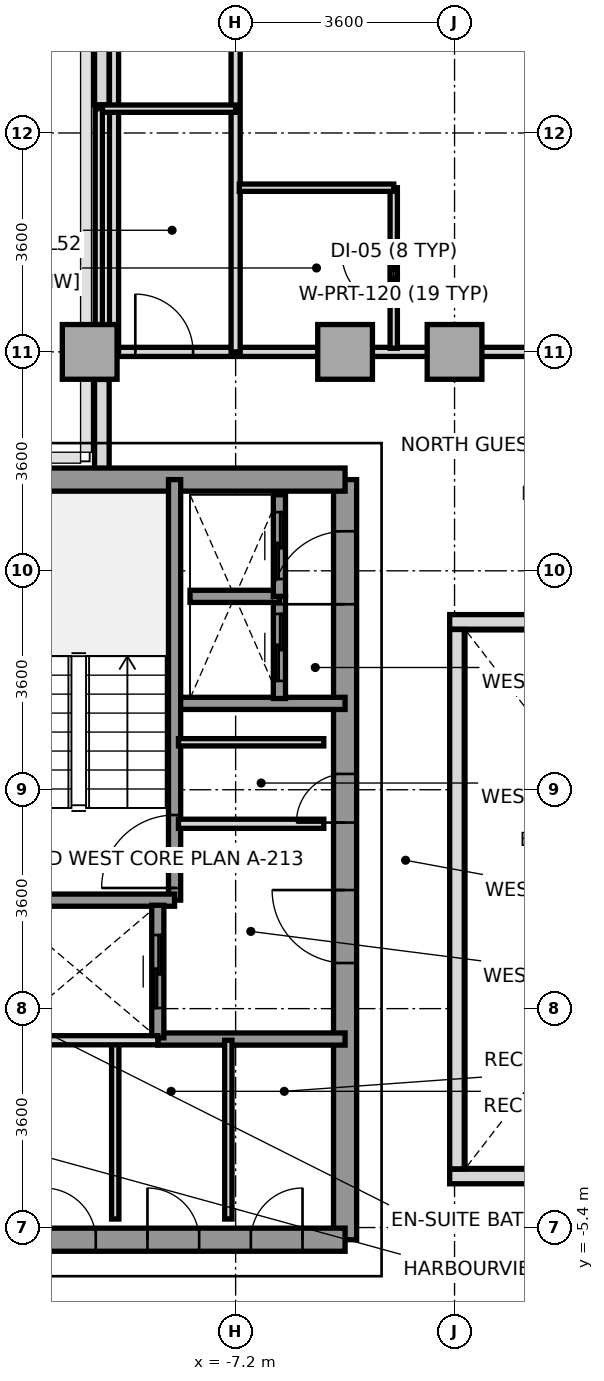
"""IFC4 building model, lengths in metres.
Left out: names, types, materials, properties, quantities, classifications, styles, units other than length and angle.
Written with IfcOpenShell. Run it as: python <this file> out.ifc"""

import sys

from ifc_helpers import new_model, si_unit, direction, frame, frame_2d, origin, origin_2d, place, context, subcontext, project, spatial, rectangle, extrude, source, transform, mapped, element, fill, save


model = new_model("IFC4")
c1 = context("Model", 3, precision=1e-05, world=origin(), true_north=direction((0.0, 1.0)))
c2 = subcontext(c1, "Body", "Model", "MODEL_VIEW")
j1 = project(units=[si_unit("LENGTHUNIT", "METRE"), si_unit("PLANEANGLEUNIT", "RADIAN")], contexts=[c1])
p1 = place(None, origin())
s1 = spatial("IfcSite", under=j1, at=p1, CompositionType="ELEMENT")
p2 = place(p1, origin())
s2 = spatial("IfcBuilding", under=s1, at=p2, CompositionType="ELEMENT")
p3 = place(p2, frame((0.0, 0.0, 191.0)))
s3 = spatial("IfcBuildingStorey", under=s2, at=p3, CompositionType="ELEMENT", Elevation=191.0)
m1 = source(origin(), c2, "Body", "SweptSolid", [
    extrude(rectangle(XDim=0.9, YDim=0.9, at=origin_2d()), origin(), (0.0, 0.0, 1.0), 3.2),
])
for number, where, z_axis, x_axis in (
    (1, (-9.6, 9.0, 0.0), (0.0, 0.0, 1.0), (1.0, 0.0, 0.0)),
    (2, (-5.4, 9.0, 0.0), (0.0, 0.0, 1.0), (1.0, 0.0, 0.0)),
    (3, (-3.6, 9.0, 0.0), (0.0, 0.0, 1.0), (1.0, 0.0, 0.0)),
):
    element("IfcColumn", number, at=place(p3, frame(where, z_axis=z_axis, x_axis=x_axis)), inside=s3, PredefinedType="COLUMN", context=c2, shape_type="MappedRepresentation", body=[
        mapped(m1, transform((0.0, 0.0, 0.0), x_axis=(1.0, 0.0, 0.0), y_axis=(0.0, 1.0, 0.0), z_axis=(0.0, 0.0, 1.0), scale=1.0)),
    ])
p4 = place(p3, frame((-9.4, 6.953, 0.0), z_axis=(0.0, 0.0, 1.0), x_axis=(0.0, 1.0, 0.0)))
e4 = element("IfcWall", 4, at=p4, inside=s3, PredefinedType="PARAPET", context=c2, shape_type="SweptSolid", body=[
    extrude(rectangle(XDim=1.594, YDim=0.24, at=frame_2d((0.797, 0.0))), origin(), (0.0, 0.0, 1.0), 1.15),
])
p5 = place(p3, frame((-9.4, 13.063, 0.0), z_axis=(0.0, 0.0, 1.0), x_axis=(0.0, 1.0, 0.0)))
e5 = element("IfcWall", 5, at=p5, inside=s3, PredefinedType="PARAPET", context=c2, shape_type="SweptSolid", body=[
    extrude(rectangle(XDim=2.54, YDim=0.24, at=frame_2d((1.27, 0.0))), origin(), (0.0, 0.0, 1.0), 1.15),
])
p6 = place(p3, frame((-5.4, -5.6, 0.0), z_axis=(0.0, 0.0, 1.0), x_axis=(0.0, 1.0, 0.0)))
e6 = element("IfcWall", 6, at=p6, inside=s3, PredefinedType="SHEAR", context=c2, shape_type="SweptSolid", body=[
    extrude(rectangle(XDim=12.5, YDim=0.38, at=frame_2d((6.25, 0.0))), origin(), (0.0, 0.0, 1.0), 3.2),
])
p7 = place(p6, frame((4.55, 0.0, 0.0)))
e7 = element("IfcOpeningElement", 7, at=p7, cuts=e6, PredefinedType="OPENING", context=c2, shape_type="SweptSolid", body=[
    extrude(rectangle(XDim=1.2, YDim=2.2, at=frame_2d((0.6, 1.1))), frame((0.0, 0.2, 0.0), z_axis=(0.0, -1.0, 0.0), x_axis=(1.0, 0.0, 0.0)), (0.0, 0.0, 1.0), 0.4),
])
p8 = place(p6, frame((10.45, 0.0, 0.0)))
e8 = element("IfcOpeningElement", 8, at=p8, cuts=e6, PredefinedType="OPENING", context=c2, shape_type="SweptSolid", body=[
    extrude(rectangle(XDim=1.2, YDim=2.2, at=frame_2d((0.6, 1.1))), frame((0.0, 0.2, 0.0), z_axis=(0.0, -1.0, 0.0), x_axis=(1.0, 0.0, 0.0)), (0.0, 0.0, 1.0), 0.4),
])
p9 = place(p6, frame((6.86, 0.0, 0.0)))
e9 = element("IfcOpeningElement", 9, at=p9, cuts=e6, PredefinedType="OPENING", context=c2, shape_type="SweptSolid", body=[
    extrude(rectangle(XDim=0.8, YDim=2.1, at=frame_2d((0.4, 1.05))), frame((0.0, 0.2, 0.0), z_axis=(0.0, -1.0, 0.0), x_axis=(1.0, 0.0, 0.0)), (0.0, 0.0, 1.0), 0.4),
])
p10 = place(p3, frame((-11.356, 6.9, 0.0), z_axis=(0.0, 0.0, 1.0), x_axis=(1.0, 0.0, 0.0)))
e10 = element("IfcWall", 10, at=p10, inside=s3, PredefinedType="SHEAR", context=c2, shape_type="SweptSolid", body=[
    extrude(rectangle(XDim=5.956, YDim=0.38, at=frame_2d((2.978, 0.0))), origin(), (0.0, 0.0, 1.0), 3.2),
])
p11 = place(p3, frame((-13.2, -5.6, 0.0), z_axis=(0.0, 0.0, 1.0), x_axis=(1.0, 0.0, 0.0)))
e11 = element("IfcWall", 11, at=p11, inside=s3, PredefinedType="SHEAR", context=c2, shape_type="SweptSolid", body=[
    extrude(rectangle(XDim=7.8, YDim=0.38, at=frame_2d((3.9, 0.0))), origin(), (0.0, 0.0, 1.0), 3.2),
])
p12 = place(p11, frame((0.28, 0.0, 0.0)))
e12 = element("IfcOpeningElement", 12, at=p12, cuts=e11, PredefinedType="OPENING", context=c2, shape_type="SweptSolid", body=[
    extrude(rectangle(XDim=0.85, YDim=2.1, at=frame_2d((0.425, 1.05))), frame((0.0, 0.2, 0.0), z_axis=(0.0, -1.0, 0.0), x_axis=(1.0, 0.0, 0.0)), (0.0, 0.0, 1.0), 0.4),
])
p13 = place(p11, frame((1.36, 0.0, 0.0)))
e13 = element("IfcOpeningElement", 13, at=p13, cuts=e11, PredefinedType="OPENING", context=c2, shape_type="SweptSolid", body=[
    extrude(rectangle(XDim=0.85, YDim=2.1, at=frame_2d((0.425, 1.05))), frame((0.0, 0.2, 0.0), z_axis=(0.0, -1.0, 0.0), x_axis=(1.0, 0.0, 0.0)), (0.0, 0.0, 1.0), 0.4),
])
p14 = place(p11, frame((2.85, 0.0, 0.0)))
e14 = element("IfcOpeningElement", 14, at=p14, cuts=e11, PredefinedType="OPENING", context=c2, shape_type="SweptSolid", body=[
    extrude(rectangle(XDim=0.85, YDim=2.1, at=frame_2d((0.425, 1.05))), frame((0.0, 0.2, 0.0), z_axis=(0.0, -1.0, 0.0), x_axis=(1.0, 0.0, 0.0)), (0.0, 0.0, 1.0), 0.4),
])
p15 = place(p11, frame((4.55, 0.0, 0.0)))
e15 = element("IfcOpeningElement", 15, at=p15, cuts=e11, PredefinedType="OPENING", context=c2, shape_type="SweptSolid", body=[
    extrude(rectangle(XDim=0.85, YDim=2.1, at=frame_2d((0.425, 1.05))), frame((0.0, 0.2, 0.0), z_axis=(0.0, -1.0, 0.0), x_axis=(1.0, 0.0, 0.0)), (0.0, 0.0, 1.0), 0.4),
])
p16 = place(p11, frame((6.25, 0.0, 0.0)))
e16 = element("IfcOpeningElement", 16, at=p16, cuts=e11, PredefinedType="OPENING", context=c2, shape_type="SweptSolid", body=[
    extrude(rectangle(XDim=0.85, YDim=2.1, at=frame_2d((0.425, 1.05))), frame((0.0, 0.2, 0.0), z_axis=(0.0, -1.0, 0.0), x_axis=(1.0, 0.0, 0.0)), (0.0, 0.0, 1.0), 0.4),
])
p17 = place(p3, frame((-8.18, 3.22, 0.0), z_axis=(0.0, 0.0, 1.0), x_axis=(1.0, 0.0, 0.0)))
e17 = element("IfcWall", 17, at=p17, inside=s3, PredefinedType="SOLIDWALL", context=c2, shape_type="SweptSolid", body=[
    extrude(rectangle(XDim=2.78, YDim=0.2, at=frame_2d((1.39, 0.0))), origin(), (0.0, 0.0, 1.0), 3.2),
])
p18 = place(p3, frame((-8.48, -2.3, 0.0), z_axis=(0.0, 0.0, 1.0), x_axis=(1.0, 0.0, 0.0)))
e18 = element("IfcWall", 18, at=p18, inside=s3, PredefinedType="SOLIDWALL", context=c2, shape_type="SweptSolid", body=[
    extrude(rectangle(XDim=3.08, YDim=0.2, at=frame_2d((1.54, 0.0))), origin(), (0.0, 0.0, 1.0), 3.2),
])
p19 = place(p3, frame((-8.204, -0.016, 0.0), z_axis=(0.0, 0.0, 1.0), x_axis=(0.0, 1.0, 0.0)))
e19 = element("IfcWall", 19, at=p19, inside=s3, PredefinedType="SOLIDWALL", context=c2, shape_type="SweptSolid", body=[
    extrude(rectangle(XDim=6.916, YDim=0.2, at=frame_2d((3.458, 0.0))), origin(), (0.0, 0.0, 1.0), 3.2),
])
p20 = place(p19, frame((0.2, 0.0, 0.0)))
e20 = element("IfcOpeningElement", 20, at=p20, cuts=e19, PredefinedType="OPENING", context=c2, shape_type="SweptSolid", body=[
    extrude(rectangle(XDim=1.2, YDim=2.2, at=frame_2d((0.6, 1.1))), frame((0.0, 0.11, 0.0), z_axis=(0.0, -1.0, 0.0), x_axis=(1.0, 0.0, 0.0)), (0.0, 0.0, 1.0), 0.22),
])
p21 = place(p3, frame((-11.356, -0.016, 0.0), z_axis=(0.0, 0.0, 1.0), x_axis=(1.0, 0.0, 0.0)))
e21 = element("IfcWall", 21, at=p21, inside=s3, PredefinedType="SOLIDWALL", context=c2, shape_type="SweptSolid", body=[
    extrude(rectangle(XDim=3.152, YDim=0.2, at=frame_2d((1.576, 0.0))), origin(), (0.0, 0.0, 1.0), 3.2),
])
p22 = place(p3, frame((-8.48, -2.28, 0.0), z_axis=(0.0, 0.0, 1.0), x_axis=(0.0, 1.0, 0.0)))
e22 = element("IfcWall", 22, at=p22, inside=s3, PredefinedType="SOLIDWALL", context=c2, shape_type="SweptSolid", body=[
    extrude(rectangle(XDim=2.18, YDim=0.2, at=frame_2d((1.09, 0.0))), origin(), (0.0, 0.0, 1.0), 3.2),
])
p23 = place(p22, frame((0.49, 0.0, 0.0)))
e23 = element("IfcOpeningElement", 23, at=p23, cuts=e22, PredefinedType="OPENING", context=c2, shape_type="SweptSolid", body=[
    extrude(rectangle(XDim=1.2, YDim=2.2, at=frame_2d((0.6, 1.1))), frame((0.0, 0.11, 0.0), z_axis=(0.0, -1.0, 0.0), x_axis=(1.0, 0.0, 0.0)), (0.0, 0.0, 1.0), 0.22),
])
p24 = place(p3, frame((-6.48, 3.3, 0.0), z_axis=(0.0, 0.0, 1.0), x_axis=(0.0, 1.0, 0.0)))
e24 = element("IfcWall", 24, at=p24, inside=s3, PredefinedType="SOLIDWALL", context=c2, shape_type="SweptSolid", body=[
    extrude(rectangle(XDim=1.68, YDim=0.2, at=frame_2d((0.84, 0.0))), origin(), (0.0, 0.0, 1.0), 3.2),
])
p25 = place(p24, frame((0.29, 0.0, 0.0)))
e25 = element("IfcOpeningElement", 25, at=p25, cuts=e24, PredefinedType="OPENING", context=c2, shape_type="SweptSolid", body=[
    extrude(rectangle(XDim=1.1, YDim=2.2, at=frame_2d((0.55, 1.1))), frame((0.0, 0.11, 0.0), z_axis=(0.0, -1.0, 0.0), x_axis=(1.0, 0.0, 0.0)), (0.0, 0.0, 1.0), 0.22),
])
p26 = place(p3, frame((-7.95, 4.98, 0.0), z_axis=(0.0, 0.0, 1.0), x_axis=(1.0, 0.0, 0.0)))
e26 = element("IfcWall", 26, at=p26, inside=s3, PredefinedType="SOLIDWALL", context=c2, shape_type="SweptSolid", body=[
    extrude(rectangle(XDim=1.47, YDim=0.2, at=frame_2d((0.735, 0.0))), origin(), (0.0, 0.0, 1.0), 3.2),
])
p27 = place(p3, frame((-6.48, 4.98, 0.0), z_axis=(0.0, 0.0, 1.0), x_axis=(0.0, 1.0, 0.0)))
e27 = element("IfcWall", 27, at=p27, inside=s3, PredefinedType="SOLIDWALL", context=c2, shape_type="SweptSolid", body=[
    extrude(rectangle(XDim=1.67, YDim=0.2, at=frame_2d((0.835, 0.0))), origin(), (0.0, 0.0, 1.0), 3.2),
])
p28 = place(p27, frame((0.285, 0.0, 0.0)))
e28 = element("IfcOpeningElement", 28, at=p28, cuts=e27, PredefinedType="OPENING", context=c2, shape_type="SweptSolid", body=[
    extrude(rectangle(XDim=1.1, YDim=2.2, at=frame_2d((0.55, 1.1))), frame((0.0, 0.11, 0.0), z_axis=(0.0, -1.0, 0.0), x_axis=(1.0, 0.0, 0.0)), (0.0, 0.0, 1.0), 0.22),
])
p29 = place(p3, frame((-8.14, 1.24, 0.0), z_axis=(0.0, 0.0, 1.0), x_axis=(1.0, 0.0, 0.0)))
e29 = element("IfcWall", 29, at=p29, inside=s3, PredefinedType="PARTITIONING", context=c2, shape_type="SweptSolid", body=[
    extrude(rectangle(XDim=2.39, YDim=0.15, at=frame_2d((1.195, 0.0))), origin(), (0.0, 0.0, 1.0), 2.3),
])
p30 = place(p3, frame((-8.14, 2.58, 0.0), z_axis=(0.0, 0.0, 1.0), x_axis=(1.0, 0.0, 0.0)))
e30 = element("IfcWall", 30, at=p30, inside=s3, PredefinedType="PARTITIONING", context=c2, shape_type="SweptSolid", body=[
    extrude(rectangle(XDim=2.39, YDim=0.12, at=frame_2d((1.195, 0.0))), origin(), (0.0, 0.0, 1.0), 2.3),
])
for number, where, z_axis, x_axis in (
    (31, (-9.18, -5.26, 0.0), (0.0, 0.0, 1.0), (0.0, 1.0, 0.0)),
    (32, (-7.32, -5.26, 0.0), (0.0, 0.0, 1.0), (0.0, 1.0, 0.0)),
):
    element("IfcWall", number, at=place(p3, frame(where, z_axis=z_axis, x_axis=x_axis)), inside=s3, PredefinedType="PARTITIONING", context=c2, shape_type="SweptSolid", body=[
        extrude(rectangle(XDim=2.94, YDim=0.12, at=frame_2d((1.47, 0.0))), origin(), (0.0, 0.0, 1.0), 3.2),
    ])
p31 = place(p3, frame((-11.04, -2.32, 0.0), z_axis=(0.0, 0.0, 1.0), x_axis=(1.0, 0.0, 0.0)))
e33 = element("IfcWall", 33, at=p31, inside=s3, PredefinedType="PARTITIONING", context=c2, shape_type="SweptSolid", body=[
    extrude(rectangle(XDim=2.56, YDim=0.15, at=frame_2d((1.28, 0.0))), origin(), (0.0, 0.0, 1.0), 3.2),
])
p32 = place(p3, frame((-9.55, 9.0, 0.0), z_axis=(0.0, 0.0, 1.0), x_axis=(1.0, 0.0, 0.0)))
e34 = element("IfcWall", 34, at=p32, inside=s3, PredefinedType="PARTITIONING", context=c2, shape_type="SweptSolid", body=[
    extrude(rectangle(XDim=19.1, YDim=0.15, at=frame_2d((9.55, 0.0))), origin(), (0.0, 0.0, 1.0), 2.75),
])
p33 = place(p32, frame((0.7, 0.0, 0.0)))
e35 = element("IfcOpeningElement", 35, at=p33, cuts=e34, PredefinedType="OPENING", context=c2, shape_type="SweptSolid", body=[
    extrude(rectangle(XDim=0.95, YDim=2.15, at=frame_2d((0.475, 1.075))), frame((0.0, 0.085, 0.0), z_axis=(0.0, -1.0, 0.0), x_axis=(1.0, 0.0, 0.0)), (0.0, 0.0, 1.0), 0.17),
])
p34 = place(p32, frame((7.15, 0.0, 0.0)))
e36 = element("IfcOpeningElement", 36, at=p34, cuts=e34, PredefinedType="OPENING", context=c2, shape_type="SweptSolid", body=[
    extrude(rectangle(XDim=0.95, YDim=2.15, at=frame_2d((0.475, 1.075))), frame((0.0, 0.085, 0.0), z_axis=(0.0, -1.0, 0.0), x_axis=(1.0, 0.0, 0.0)), (0.0, 0.0, 1.0), 0.17),
])
p35 = place(p32, frame((11.55, 0.0, 0.0)))
e37 = element("IfcOpeningElement", 37, at=p35, cuts=e34, PredefinedType="OPENING", context=c2, shape_type="SweptSolid", body=[
    extrude(rectangle(XDim=0.95, YDim=2.15, at=frame_2d((0.475, 1.075))), frame((0.0, 0.085, 0.0), z_axis=(0.0, -1.0, 0.0), x_axis=(1.0, 0.0, 0.0)), (0.0, 0.0, 1.0), 0.17),
])
p36 = place(p3, frame((-9.2, 9.0, 0.0), z_axis=(0.0, 0.0, 1.0), x_axis=(0.0, 1.0, 0.0)))
e38 = element("IfcWall", 38, at=p36, inside=s3, PredefinedType="PARTITIONING", context=c2, shape_type="SweptSolid", body=[
    extrude(rectangle(XDim=6.68, YDim=0.15, at=frame_2d((3.34, 0.0))), origin(), (0.0, 0.0, 1.0), 2.75),
])
p37 = place(p3, frame((-7.2, 9.0, 0.0), z_axis=(0.0, 0.0, 1.0), x_axis=(0.0, 1.0, 0.0)))
e39 = element("IfcWall", 39, at=p37, inside=s3, PredefinedType="PARTITIONING", context=c2, shape_type="SweptSolid", body=[
    extrude(rectangle(XDim=14.4, YDim=0.15, at=frame_2d((7.2, 0.0))), origin(), (0.0, 0.0, 1.0), 2.75),
])
p38 = place(p3, frame((-9.45, 13.0, 0.0), z_axis=(0.0, 0.0, 1.0), x_axis=(1.0, 0.0, 0.0)))
e40 = element("IfcWall", 40, at=p38, inside=s3, PredefinedType="PARTITIONING", context=c2, shape_type="SweptSolid", body=[
    extrude(rectangle(XDim=2.25, YDim=0.12, at=frame_2d((1.125, 0.0))), origin(), (0.0, 0.0, 1.0), 3.2),
])
p39 = place(p3, frame((-9.45, 9.0, 0.0), z_axis=(0.0, 0.0, 1.0), x_axis=(0.0, 1.0, 0.0)))
e41 = element("IfcWall", 41, at=p39, inside=s3, PredefinedType="PARTITIONING", context=c2, shape_type="SweptSolid", body=[
    extrude(rectangle(XDim=4.0, YDim=0.12, at=frame_2d((2.0, 0.0))), origin(), (0.0, 0.0, 1.0), 3.2),
])
p40 = place(p3, frame((-4.6, 9.06, 0.0), z_axis=(0.0, 0.0, 1.0), x_axis=(0.0, 1.0, 0.0)))
e42 = element("IfcWall", 42, at=p40, inside=s3, PredefinedType="PARTITIONING", context=c2, shape_type="SweptSolid", body=[
    extrude(rectangle(XDim=2.64, YDim=0.12, at=frame_2d((1.32, 0.0))), origin(), (0.0, 0.0, 1.0), 3.2),
])
p41 = place(p40, frame((0.7, 0.0, 0.0)))
e43 = element("IfcOpeningElement", 43, at=p41, cuts=e42, PredefinedType="OPENING", context=c2, shape_type="SweptSolid", body=[
    extrude(rectangle(XDim=0.85, YDim=2.1, at=frame_2d((0.425, 1.05))), frame((0.0, 0.07, 0.0), z_axis=(0.0, -1.0, 0.0), x_axis=(1.0, 0.0, 0.0)), (0.0, 0.0, 1.0), 0.14),
])
p42 = place(p3, frame((-7.14, 11.7, 0.0), z_axis=(0.0, 0.0, 1.0), x_axis=(1.0, 0.0, 0.0)))
e44 = element("IfcWall", 44, at=p42, inside=s3, PredefinedType="PARTITIONING", context=c2, shape_type="SweptSolid", body=[
    extrude(rectangle(XDim=2.54, YDim=0.12, at=frame_2d((1.27, 0.0))), origin(), (0.0, 0.0, 1.0), 3.2),
])
for number, where, z_axis, x_axis in (
    (45, (-3.68, -4.56, 0.0), (0.0, 0.0, 1.0), (1.0, 0.0, 0.0)),
    (46, (-3.68, 4.56, 0.0), (0.0, 0.0, 1.0), (1.0, 0.0, 0.0)),
):
    element("IfcWall", number, at=place(p3, frame(where, z_axis=z_axis, x_axis=x_axis)), inside=s3, PredefinedType="PARAPET", context=c2, shape_type="SweptSolid", body=[
        extrude(rectangle(XDim=7.36, YDim=0.24, at=frame_2d((3.68, 0.0))), origin(), (0.0, 0.0, 1.0), 1.15),
    ])
p43 = place(p3, frame((-3.56, -4.435, 0.0), z_axis=(0.0, 0.0, 1.0), x_axis=(0.0, 1.0, 0.0)))
e47 = element("IfcWall", 47, at=p43, inside=s3, PredefinedType="PARAPET", context=c2, shape_type="SweptSolid", body=[
    extrude(rectangle(XDim=8.87, YDim=0.24, at=frame_2d((4.435, 0.0))), origin(), (0.0, 0.0, 1.0), 1.15),
])
m2 = source(origin(), c2, "Body", "SweptSolid", [
    extrude(rectangle(XDim=1.2, YDim=2.2, at=frame_2d((0.6, 1.1))), frame((0.0, 0.025, 0.0), z_axis=(0.0, -1.0, 0.0), x_axis=(1.0, 0.0, 0.0)), (0.0, 0.0, 1.0), 0.05),
])
p44 = place(p20, origin())
e48 = element("IfcDoor", 48, at=p44, inside=s3, OperationType="SINGLE_SWING_LEFT", PredefinedType="DOOR", context=c2, shape_type="MappedRepresentation", body=[
    mapped(m2, transform((0.0, 0.0, 0.0), x_axis=(1.0, 0.0, 0.0), y_axis=(0.0, 1.0, 0.0), z_axis=(0.0, 0.0, 1.0), scale=1.0)),
])
fill(e20, e48)
p45 = place(p7, origin())
e49 = element("IfcDoor", 49, at=p45, inside=s3, OperationType="SINGLE_SWING_RIGHT", PredefinedType="DOOR", context=c2, shape_type="MappedRepresentation", body=[
    mapped(m2, transform((0.0, 0.0, 0.0), x_axis=(1.0, 0.0, 0.0), y_axis=(0.0, 1.0, 0.0), z_axis=(0.0, 0.0, 1.0), scale=1.0)),
])
fill(e7, e49)
p46 = place(p8, origin())
e50 = element("IfcDoor", 50, at=p46, inside=s3, OperationType="SINGLE_SWING_LEFT", PredefinedType="DOOR", context=c2, shape_type="MappedRepresentation", body=[
    mapped(m2, transform((0.0, 0.0, 0.0), x_axis=(1.0, 0.0, 0.0), y_axis=(0.0, 1.0, 0.0), z_axis=(0.0, 0.0, 1.0), scale=1.0)),
])
fill(e8, e50)
m3 = source(origin(), c2, "Body", "SweptSolid", [
    extrude(rectangle(XDim=0.8, YDim=2.1, at=frame_2d((0.4, 1.05))), frame((0.0, 0.025, 0.0), z_axis=(0.0, -1.0, 0.0), x_axis=(1.0, 0.0, 0.0)), (0.0, 0.0, 1.0), 0.05),
])
p47 = place(p9, origin())
e51 = element("IfcDoor", 51, at=p47, inside=s3, OperationType="SINGLE_SWING_LEFT", PredefinedType="DOOR", context=c2, shape_type="MappedRepresentation", body=[
    mapped(m3, transform((0.0, 0.0, 0.0), x_axis=(1.0, 0.0, 0.0), y_axis=(0.0, 1.0, 0.0), z_axis=(0.0, 0.0, 1.0), scale=1.0)),
])
fill(e9, e51)
m4 = source(origin(), c2, "Body", "SweptSolid", [
    extrude(rectangle(XDim=0.85, YDim=2.1, at=frame_2d((0.425, 1.05))), frame((0.0, 0.025, 0.0), z_axis=(0.0, -1.0, 0.0), x_axis=(1.0, 0.0, 0.0)), (0.0, 0.0, 1.0), 0.05),
])
p48 = place(p14, origin())
e52 = element("IfcDoor", 52, at=p48, inside=s3, OperationType="SINGLE_SWING_LEFT", PredefinedType="DOOR", context=c2, shape_type="MappedRepresentation", body=[
    mapped(m4, transform((0.0, 0.0, 0.0), x_axis=(1.0, 0.0, 0.0), y_axis=(0.0, 1.0, 0.0), z_axis=(0.0, 0.0, 1.0), scale=1.0)),
])
fill(e14, e52)
p49 = place(p15, origin())
e53 = element("IfcDoor", 53, at=p49, inside=s3, OperationType="SINGLE_SWING_LEFT", PredefinedType="DOOR", context=c2, shape_type="MappedRepresentation", body=[
    mapped(m4, transform((0.0, 0.0, 0.0), x_axis=(1.0, 0.0, 0.0), y_axis=(0.0, 1.0, 0.0), z_axis=(0.0, 0.0, 1.0), scale=1.0)),
])
fill(e15, e53)
p50 = place(p16, origin())
e54 = element("IfcDoor", 54, at=p50, inside=s3, OperationType="SINGLE_SWING_RIGHT", PredefinedType="DOOR", context=c2, shape_type="MappedRepresentation", body=[
    mapped(m4, transform((0.0, 0.0, 0.0), x_axis=(1.0, 0.0, 0.0), y_axis=(0.0, 1.0, 0.0), z_axis=(0.0, 0.0, 1.0), scale=1.0)),
])
fill(e16, e54)
p51 = place(p23, origin())
e55 = element("IfcDoor", 55, at=p51, inside=s3, OperationType="SLIDING_TO_RIGHT", PredefinedType="DOOR", context=c2, shape_type="MappedRepresentation", body=[
    mapped(m2, transform((0.0, 0.0, 0.0), x_axis=(1.0, 0.0, 0.0), y_axis=(0.0, 1.0, 0.0), z_axis=(0.0, 0.0, 1.0), scale=1.0)),
])
fill(e23, e55)
m5 = source(origin(), c2, "Body", "SweptSolid", [
    extrude(rectangle(XDim=1.1, YDim=2.2, at=frame_2d((0.55, 1.1))), frame((0.0, 0.025, 0.0), z_axis=(0.0, -1.0, 0.0), x_axis=(1.0, 0.0, 0.0)), (0.0, 0.0, 1.0), 0.05),
])
p52 = place(p25, origin())
e56 = element("IfcDoor", 56, at=p52, inside=s3, OperationType="SLIDING_TO_LEFT", PredefinedType="DOOR", context=c2, shape_type="MappedRepresentation", body=[
    mapped(m5, transform((0.0, 0.0, 0.0), x_axis=(1.0, 0.0, 0.0), y_axis=(0.0, 1.0, 0.0), z_axis=(0.0, 0.0, 1.0), scale=1.0)),
])
fill(e25, e56)
p53 = place(p28, origin())
e57 = element("IfcDoor", 57, at=p53, inside=s3, OperationType="SLIDING_TO_LEFT", PredefinedType="DOOR", context=c2, shape_type="MappedRepresentation", body=[
    mapped(m5, transform((0.0, 0.0, 0.0), x_axis=(1.0, 0.0, 0.0), y_axis=(0.0, 1.0, 0.0), z_axis=(0.0, 0.0, 1.0), scale=1.0)),
])
fill(e28, e57)
m6 = source(origin(), c2, "Body", "SweptSolid", [
    extrude(rectangle(XDim=0.95, YDim=2.15, at=frame_2d((0.475, 1.075))), frame((0.0, 0.025, 0.0), z_axis=(0.0, -1.0, 0.0), x_axis=(1.0, 0.0, 0.0)), (0.0, 0.0, 1.0), 0.05),
])
p54 = place(p33, origin())
e58 = element("IfcDoor", 58, at=p54, inside=s3, OperationType="SINGLE_SWING_LEFT", PredefinedType="DOOR", context=c2, shape_type="MappedRepresentation", body=[
    mapped(m6, transform((0.0, 0.0, 0.0), x_axis=(1.0, 0.0, 0.0), y_axis=(0.0, 1.0, 0.0), z_axis=(0.0, 0.0, 1.0), scale=1.0)),
])
fill(e35, e58)
p55 = place(p41, origin())
e59 = element("IfcDoor", 59, at=p55, inside=s3, OperationType="SINGLE_SWING_RIGHT", PredefinedType="DOOR", context=c2, shape_type="MappedRepresentation", body=[
    mapped(m4, transform((0.0, 0.0, 0.0), x_axis=(1.0, 0.0, 0.0), y_axis=(0.0, 1.0, 0.0), z_axis=(0.0, 0.0, 1.0), scale=1.0)),
])
fill(e43, e59)
save(model, sys.argv[1])
